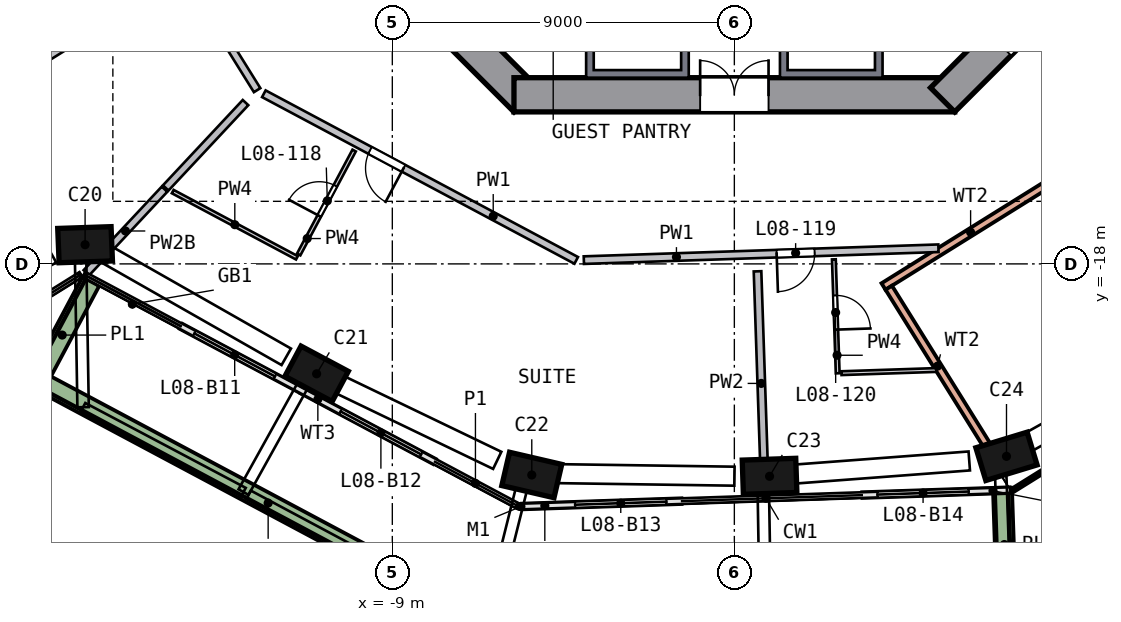
"""IFC4 building model, lengths in metres.
Left out: names, types, materials, properties, quantities, classifications, styles, units other than length and angle.
Written with IfcOpenShell. Run it as: python <this file> out.ifc"""

import sys

from ifc_helpers import new_model, si_unit, direction, frame, frame_2d, origin, origin_2d, place, context, subcontext, project, spatial, polyline, rectangle, outline, extrude, element, fill, save


model = new_model("IFC4")
c1 = context("Model", 3, precision=1e-05, world=origin(), true_north=direction((0.0, 1.0)))
c2 = subcontext(c1, "Body", "Model", "MODEL_VIEW")
j1 = project(units=[si_unit("LENGTHUNIT", "METRE"), si_unit("PLANEANGLEUNIT", "RADIAN")], contexts=[c1])
p1 = place(None, origin())
s1 = spatial("IfcSite", under=j1, at=p1, CompositionType="ELEMENT")
p2 = place(p1, origin())
s2 = spatial("IfcBuilding", under=s1, at=p2, CompositionType="ELEMENT")
p3 = place(p2, frame((0.0, 0.0, 42.5)))
s3 = spatial("IfcBuildingStorey", under=s2, at=p3, CompositionType="ELEMENT", Elevation=42.5)
p4 = place(p3, frame((-17.185, -17.397, 0.0), z_axis=(0.083388877, -0.0810324, 0.993217018), x_axis=(-0.995963497, -0.039994314, 0.080356499)))
e1 = element("IfcColumn", 1, at=p4, inside=s3, PredefinedType="COLUMN", context=c2, shape_type="SweptSolid", body=[
    extrude(rectangle(XDim=1.4, YDim=0.9, at=origin_2d()), origin(), (0.0, 0.0, 1.0), 3.212),
])
p5 = place(p3, frame((-11.113, -20.829, 0.0), z_axis=(0.099549321, -0.052094183, 0.993668017), x_axis=(0.876466072, -0.468171177, -0.112352009)))
e2 = element("IfcColumn", 2, at=p5, inside=s3, PredefinedType="COLUMN", context=c2, shape_type="SweptSolid", body=[
    extrude(rectangle(XDim=1.4, YDim=0.9, at=origin_2d()), origin(), (0.0, 0.0, 1.0), 3.21),
])
p6 = place(p3, frame((-5.466, -23.525, 0.0), z_axis=(0.112140805, -0.025013102, 0.993377463), x_axis=(-0.967681369, 0.22448272, 0.114892456)))
e3 = element("IfcColumn", 3, at=p6, inside=s3, PredefinedType="COLUMN", context=c2, shape_type="SweptSolid", body=[
    extrude(rectangle(XDim=1.4, YDim=0.9, at=origin_2d()), origin(), (0.0, 0.0, 1.0), 3.211),
])
p7 = place(p3, frame((0.791, -23.595, 0.0), z_axis=(0.112174655, 0.004715138, 0.993677319), x_axis=(0.993119451, 0.033305651, -0.112269718)))
e4 = element("IfcColumn", 4, at=p7, inside=s3, PredefinedType="COLUMN", context=c2, shape_type="SweptSolid", body=[
    extrude(rectangle(XDim=1.4, YDim=0.9, at=origin_2d()), origin(), (0.0, 0.0, 1.0), 3.21),
])
p8 = place(p3, frame((7.029, -23.106, 0.0), z_axis=(0.109632241, 0.034288586, 0.993380624), x_axis=(-0.950575339, -0.288465817, 0.114865125)))
e5 = element("IfcColumn", 5, at=p8, inside=s3, PredefinedType="COLUMN", context=c2, shape_type="SweptSolid", body=[
    extrude(rectangle(XDim=1.4, YDim=0.9, at=origin_2d()), origin(), (0.0, 0.0, 1.0), 3.211),
])
p9 = place(p3, frame((-13.682, -5.481, 0.0), z_axis=(0.0, 0.0, 1.0), x_axis=(0.707106781, -0.707106781, 0.0)))
e6 = element("IfcWall", 6, at=p9, inside=s3, PredefinedType="SHEAR", context=c2, shape_type="SweptSolid", body=[
    extrude(rectangle(XDim=11.598, YDim=0.9, at=frame_2d((5.799, 0.0))), origin(), (0.0, 0.0, 1.0), 3.5),
])
p10 = place(p9, frame((2.099, 0.0, 0.0)))
e7 = element("IfcOpeningElement", 7, at=p10, cuts=e6, PredefinedType="OPENING", context=c2, shape_type="SweptSolid", body=[
    extrude(rectangle(XDim=1.2, YDim=2.1, at=frame_2d((0.6, 1.05))), frame((0.0, 0.46, 0.0), z_axis=(0.0, -1.0, 0.0), x_axis=(1.0, 0.0, 0.0)), (0.0, 0.0, 1.0), 0.92),
])
p11 = place(p3, frame((-5.799, -13.55, 0.0), z_axis=(0.0, 0.0, 1.0), x_axis=(1.0, 0.0, 0.0)))
e8 = element("IfcWall", 8, at=p11, inside=s3, PredefinedType="SHEAR", context=c2, shape_type="SweptSolid", body=[
    extrude(rectangle(XDim=11.598, YDim=0.9, at=frame_2d((5.799, 0.0))), origin(), (0.0, 0.0, 1.0), 3.5),
])
p12 = place(p11, frame((4.899, 0.0, 0.0)))
e9 = element("IfcOpeningElement", 9, at=p12, cuts=e8, PredefinedType="OPENING", context=c2, shape_type="SweptSolid", body=[
    extrude(rectangle(XDim=1.8, YDim=2.1, at=frame_2d((0.9, 1.05))), frame((0.0, 0.46, 0.0), z_axis=(0.0, -1.0, 0.0), x_axis=(1.0, 0.0, 0.0)), (0.0, 0.0, 1.0), 0.92),
])
p13 = place(p3, frame((5.481, -13.682, 0.0), z_axis=(0.0, 0.0, 1.0), x_axis=(0.707106781, 0.707106781, 0.0)))
e10 = element("IfcWall", 10, at=p13, inside=s3, PredefinedType="SHEAR", context=c2, shape_type="SweptSolid", body=[
    extrude(rectangle(XDim=11.598, YDim=0.9, at=frame_2d((5.799, 0.0))), origin(), (0.0, 0.0, 1.0), 3.5),
])
p14 = place(p13, frame((2.099, 0.0, 0.0)))
e11 = element("IfcOpeningElement", 11, at=p14, cuts=e10, PredefinedType="OPENING", context=c2, shape_type="SweptSolid", body=[
    extrude(rectangle(XDim=1.2, YDim=2.1, at=frame_2d((0.6, 1.05))), frame((0.0, 0.46, 0.0), z_axis=(0.0, -1.0, 0.0), x_axis=(1.0, 0.0, 0.0)), (0.0, 0.0, 1.0), 0.92),
])
p15 = place(p3, frame((-14.559, -19.642, 0.0), z_axis=(0.0, 0.0, 1.0), x_axis=(0.882272201, -0.470739592, 0.0)))
e12 = element("IfcWall", 12, at=p15, inside=s3, PredefinedType="SOLIDWALL", context=c2, shape_type="SweptSolid", body=[
    extrude(rectangle(XDim=3.6, YDim=0.15, at=frame_2d((1.8, 0.0))), origin(), (0.0, 0.0, 1.0), 2.425),
])
p16 = place(p15, frame((0.4, 0.0, 0.0)))
e13 = element("IfcOpeningElement", 13, at=p16, cuts=e12, PredefinedType="OPENING", context=c2, shape_type="SweptSolid", body=[
    extrude(rectangle(XDim=2.4, YDim=2.4, at=frame_2d((1.2, 1.2))), frame((0.0, 0.085, 0.0), z_axis=(0.0, -1.0, 0.0), x_axis=(1.0, 0.0, 0.0)), (0.0, 0.0, 1.0), 0.17),
])
p17 = place(p3, frame((-11.383, -21.337, 0.0), z_axis=(0.0, 0.0, 1.0), x_axis=(0.882291504, -0.470703411, 0.0)))
e14 = element("IfcWall", 14, at=p17, inside=s3, PredefinedType="SOLIDWALL", context=c2, shape_type="SweptSolid", body=[
    extrude(rectangle(XDim=3.961, YDim=0.15, at=frame_2d((1.98, 0.0))), origin(), (0.0, 0.0, 1.0), 2.425),
])
p18 = place(p17, frame((1.16, 0.0, 0.0)))
e15 = element("IfcOpeningElement", 15, at=p18, cuts=e14, PredefinedType="OPENING", context=c2, shape_type="SweptSolid", body=[
    extrude(rectangle(XDim=2.4, YDim=2.4, at=frame_2d((1.2, 1.2))), frame((0.0, 0.085, 0.0), z_axis=(0.0, -1.0, 0.0), x_axis=(1.0, 0.0, 0.0)), (0.0, 0.0, 1.0), 0.17),
])
p19 = place(p3, frame((-5.586, -24.384, 0.0), z_axis=(0.0, 0.0, 1.0), x_axis=(0.999437006, 0.033551033, 0.0)))
e16 = element("IfcWall", 16, at=p19, inside=s3, PredefinedType="SOLIDWALL", context=c2, shape_type="SweptSolid", body=[
    extrude(rectangle(XDim=4.199, YDim=0.15, at=frame_2d((2.099, 0.0))), origin(), (0.0, 0.0, 1.0), 2.425),
])
p20 = place(p19, frame((1.399, 0.0, 0.0)))
e17 = element("IfcOpeningElement", 17, at=p20, cuts=e16, PredefinedType="OPENING", context=c2, shape_type="SweptSolid", body=[
    extrude(rectangle(XDim=2.4, YDim=2.4, at=frame_2d((1.2, 1.2))), frame((0.0, 0.085, 0.0), z_axis=(0.0, -1.0, 0.0), x_axis=(1.0, 0.0, 0.0)), (0.0, 0.0, 1.0), 0.17),
])
p21 = place(p3, frame((3.367, -24.084, 0.0), z_axis=(0.0, 0.0, 1.0), x_axis=(0.99944008, 0.033459324, 0.0)))
e18 = element("IfcWall", 18, at=p21, inside=s3, PredefinedType="SOLIDWALL", context=c2, shape_type="SweptSolid", body=[
    extrude(rectangle(XDim=3.882, YDim=0.15, at=frame_2d((1.941, 0.0))), origin(), (0.0, 0.0, 1.0), 2.425),
])
p22 = place(p21, frame((0.4, 0.0, 0.0)))
e19 = element("IfcOpeningElement", 19, at=p22, cuts=e18, PredefinedType="OPENING", context=c2, shape_type="SweptSolid", body=[
    extrude(rectangle(XDim=2.4, YDim=2.4, at=frame_2d((1.2, 1.2))), frame((0.0, 0.085, 0.0), z_axis=(0.0, -1.0, 0.0), x_axis=(1.0, 0.0, 0.0)), (0.0, 0.0, 1.0), 0.17),
])
p23 = place(p3, frame((-16.933, -18.462, 0.0), z_axis=(0.0, 0.0, 1.0), x_axis=(-0.470655574, -0.882317024, 0.0)))
e20 = element("IfcWall", 20, at=p23, inside=s3, PredefinedType="SOLIDWALL", context=c2, shape_type="SweptSolid", body=[
    extrude(rectangle(XDim=3.199, YDim=0.5, at=frame_2d((1.6, 0.0))), origin(), (0.0, 0.0, 1.0), 0.7),
])
p24 = place(p3, frame((-18.101, -21.181, 0.0), z_axis=(0.0, 0.0, 1.0), x_axis=(0.882291093, -0.470704182, 0.0)))
e21 = element("IfcWall", 21, at=p24, inside=s3, PredefinedType="SOLIDWALL", context=c2, shape_type="SweptSolid", body=[
    extrude(rectangle(XDim=13.224, YDim=0.5, at=frame_2d((6.612, 0.0))), origin(), (0.0, 0.0, 1.0), 0.7),
])
p25 = place(p3, frame((7.15, -26.734, 0.0), z_axis=(0.0, 0.0, 1.0), x_axis=(-0.033468433, 0.999439775, 0.0)))
e22 = element("IfcWall", 22, at=p25, inside=s3, PredefinedType="SOLIDWALL", context=c2, shape_type="SweptSolid", body=[
    extrude(rectangle(XDim=2.699, YDim=0.5, at=frame_2d((1.35, 0.0))), origin(), (0.0, 0.0, 1.0), 0.7),
])
p26 = place(p3, frame((14.959, -11.721, 0.0), z_axis=(0.0, 0.0, 1.0), x_axis=(-0.848786551, -0.528735653, 0.0)))
e23 = element("IfcWall", 23, at=p26, inside=s3, PredefinedType="SOLIDWALL", context=c2, shape_type="SweptSolid", body=[
    extrude(rectangle(XDim=13.0, YDim=0.2, at=frame_2d((6.5, 0.0))), origin(), (0.0, 0.0, 1.0), 3.19),
])
p27 = place(p26, frame((5.6, 0.0, 0.0)))
e24 = element("IfcOpeningElement", 24, at=p27, cuts=e23, PredefinedType="OPENING", context=c2, shape_type="SweptSolid", body=[
    extrude(rectangle(XDim=1.8, YDim=2.4, at=frame_2d((0.9, 1.2))), frame((0.0, 0.11, 0.0), z_axis=(0.0, -1.0, 0.0), x_axis=(1.0, 0.0, 0.0)), (0.0, 0.0, 1.0), 0.22),
])
p28 = place(p3, frame((6.633, -22.753, 0.0), z_axis=(0.0, 0.0, 1.0), x_axis=(-0.528716192, 0.848798674, 0.0)))
e25 = element("IfcWall", 25, at=p28, inside=s3, PredefinedType="SOLIDWALL", context=c2, shape_type="SweptSolid", body=[
    extrude(rectangle(XDim=4.861, YDim=0.2, at=frame_2d((2.43, 0.0))), origin(), (0.0, 0.0, 1.0), 3.19),
])
p29 = place(p3, frame((7.351, -23.942, 0.0), z_axis=(0.0, 0.0, 1.0), x_axis=(0.8487921, 0.528726745, 0.0)))
e26 = element("IfcWall", 26, at=p29, inside=s3, PredefinedType="SOLIDWALL", context=c2, shape_type="SweptSolid", body=[
    extrude(rectangle(XDim=12.84, YDim=0.1, at=frame_2d((6.42, 0.0))), origin(), (0.0, 0.0, 1.0), 0.7),
])
p30 = place(p3, origin())
e27 = element("IfcWall", 27, at=p30, inside=s3, PredefinedType="SOLIDWALL", context=c2, shape_type="SweptSolid", body=[
    extrude(outline(polyline([(-1.2, -13.1), (-3.9, -13.1), (-3.9, -10.7), (-1.2, -10.7), (-1.2, -13.1)]), holes=[polyline([(-3.7, -10.9), (-3.7, -12.9), (-1.4, -12.9), (-1.4, -10.9), (-3.7, -10.9)])]), origin(), (0.0, 0.0, 1.0), 3.19),
])
p31 = place(p3, origin())
e28 = element("IfcWall", 28, at=p31, inside=s3, PredefinedType="SOLIDWALL", context=c2, shape_type="SweptSolid", body=[
    extrude(outline(polyline([(3.9, -10.7), (3.9, -13.1), (1.2, -13.1), (1.2, -10.7), (3.9, -10.7)]), holes=[polyline([(1.4, -12.9), (3.7, -12.9), (3.7, -10.9), (1.4, -10.9), (1.4, -12.9)])]), origin(), (0.0, 0.0, 1.0), 3.19),
])
p32 = place(p3, frame((-30.545, -17.731, 0.0), z_axis=(0.0, 0.0, 1.0), x_axis=(0.848790586, 0.528729175, 0.0)))
e29 = element("IfcWall", 29, at=p32, inside=s3, PredefinedType="SOLIDWALL", context=c2, shape_type="SweptSolid", body=[
    extrude(rectangle(XDim=17.343, YDim=0.2, at=frame_2d((8.671, 0.0))), origin(), (0.0, 0.0, 1.0), 3.19),
])
p33 = place(p32, frame((9.5, 0.0, 0.0)))
e30 = element("IfcOpeningElement", 30, at=p33, cuts=e29, PredefinedType="OPENING", context=c2, shape_type="SweptSolid", body=[
    extrude(rectangle(XDim=1.0, YDim=2.1, at=frame_2d((0.5, 1.05))), frame((0.0, 0.11, 0.0), z_axis=(0.0, -1.0, 0.0), x_axis=(1.0, 0.0, 0.0)), (0.0, 0.0, 1.0), 0.22),
])
p34 = place(p3, frame((-14.491, -10.323, 0.0), z_axis=(0.0, 0.0, 1.0), x_axis=(-0.848783902, -0.528739905, 0.0)))
e31 = element("IfcWall", 31, at=p34, inside=s3, PredefinedType="SOLIDWALL", context=c2, shape_type="SweptSolid", body=[
    extrude(rectangle(XDim=17.543, YDim=0.2, at=frame_2d((8.771, 0.0))), origin(), (0.0, 0.0, 1.0), 3.19),
])
p35 = place(p34, frame((12.8, 0.0, 0.0)))
e32 = element("IfcOpeningElement", 32, at=p35, cuts=e31, PredefinedType="OPENING", context=c2, shape_type="SweptSolid", body=[
    extrude(rectangle(XDim=1.0, YDim=2.1, at=frame_2d((0.5, 1.05))), frame((0.0, 0.11, 0.0), z_axis=(0.0, -1.0, 0.0), x_axis=(1.0, 0.0, 0.0)), (0.0, 0.0, 1.0), 0.22),
])
p36 = place(p3, frame((-14.386, -10.493, 0.0), z_axis=(0.0, 0.0, 1.0), x_axis=(0.52876097, -0.84877078, 0.0)))
e33 = element("IfcWall", 33, at=p36, inside=s3, PredefinedType="SOLIDWALL", context=c2, shape_type="SweptSolid", body=[
    extrude(rectangle(XDim=3.458, YDim=0.2, at=frame_2d((1.729, 0.0))), origin(), (0.0, 0.0, 1.0), 3.19),
])
p37 = place(p3, frame((-4.161, -17.907, 0.0), z_axis=(0.0, 0.0, 1.0), x_axis=(-0.882295625, 0.470695688, 0.0)))
e34 = element("IfcWall", 34, at=p37, inside=s3, PredefinedType="SOLIDWALL", context=c2, shape_type="SweptSolid", body=[
    extrude(rectangle(XDim=9.316, YDim=0.2, at=frame_2d((4.658, 0.0))), origin(), (0.0, 0.0, 1.0), 3.19),
])
p38 = place(p37, frame((5.15, 0.0, 0.0)))
e35 = element("IfcOpeningElement", 35, at=p38, cuts=e34, PredefinedType="OPENING", context=c2, shape_type="SweptSolid", body=[
    extrude(rectangle(XDim=1.0, YDim=2.1, at=frame_2d((0.5, 1.05))), frame((0.0, 0.11, 0.0), z_axis=(0.0, -1.0, 0.0), x_axis=(1.0, 0.0, 0.0)), (0.0, 0.0, 1.0), 0.22),
])
p39 = place(p3, frame((5.371, -17.588, 0.0), z_axis=(0.0, 0.0, 1.0), x_axis=(-0.999438766, -0.033498549, 0.0)))
e36 = element("IfcWall", 36, at=p39, inside=s3, PredefinedType="SOLIDWALL", context=c2, shape_type="SweptSolid", body=[
    extrude(rectangle(XDim=9.336, YDim=0.2, at=frame_2d((4.668, 0.0))), origin(), (0.0, 0.0, 1.0), 3.19),
])
p40 = place(p39, frame((3.26, 0.0, 0.0)))
e37 = element("IfcOpeningElement", 37, at=p40, cuts=e36, PredefinedType="OPENING", context=c2, shape_type="SweptSolid", body=[
    extrude(rectangle(XDim=1.0, YDim=2.1, at=frame_2d((0.5, 1.05))), frame((0.0, 0.11, 0.0), z_axis=(0.0, -1.0, 0.0), x_axis=(1.0, 0.0, 0.0)), (0.0, 0.0, 1.0), 0.22),
])
p41 = place(p3, frame((-14.994, -16.034, 0.0), z_axis=(0.0, 0.0, 1.0), x_axis=(-0.682993923, -0.730424056, 0.0)))
e38 = element("IfcWall", 38, at=p41, inside=s3, PredefinedType="SOLIDWALL", context=c2, shape_type="SweptSolid", body=[
    extrude(rectangle(XDim=3.011, YDim=0.2, at=frame_2d((1.506, 0.0))), origin(), (0.0, 0.0, 1.0), 2.69),
])
p42 = place(p3, frame((-12.863, -13.755, 0.0), z_axis=(0.0, 0.0, 1.0), x_axis=(-0.683008227, -0.730410681, 0.0)))
e39 = element("IfcWall", 39, at=p42, inside=s3, PredefinedType="SOLIDWALL", context=c2, shape_type="SweptSolid", body=[
    extrude(rectangle(XDim=3.075, YDim=0.2, at=frame_2d((1.537, 0.0))), origin(), (0.0, 0.0, 1.0), 3.19),
])
p43 = place(p3, frame((0.61, -18.195, 0.0), z_axis=(0.0, 0.0, 1.0), x_axis=(0.033460809, -0.99944003, 0.0)))
e40 = element("IfcWall", 40, at=p43, inside=s3, PredefinedType="SOLIDWALL", context=c2, shape_type="SweptSolid", body=[
    extrude(rectangle(XDim=5.903, YDim=0.2, at=frame_2d((2.951, 0.0))), origin(), (0.0, 0.0, 1.0), 3.19),
])
p44 = place(p3, frame((-11.511, -17.84, 0.0), z_axis=(0.0, 0.0, 1.0), x_axis=(-0.882303673, 0.470680601, 0.0)))
e41 = element("IfcWall", 41, at=p44, inside=s3, PredefinedType="PARTITIONING", context=c2, shape_type="SweptSolid", body=[
    extrude(rectangle(XDim=3.704, YDim=0.1, at=frame_2d((1.852, 0.0))), origin(), (0.0, 0.0, 1.0), 3.19),
])
p45 = place(p3, frame((-11.464, -17.752, 0.0), z_axis=(0.0, 0.0, 1.0), x_axis=(0.470714946, 0.88228535, 0.0)))
e42 = element("IfcWall", 42, at=p45, inside=s3, PredefinedType="PARTITIONING", context=c2, shape_type="SweptSolid", body=[
    extrude(rectangle(XDim=3.1, YDim=0.1, at=frame_2d((1.55, 0.0))), origin(), (0.0, 0.0, 1.0), 3.19),
])
p46 = place(p45, frame((1.15, 0.0, 0.0)))
e43 = element("IfcOpeningElement", 43, at=p46, cuts=e42, PredefinedType="OPENING", context=c2, shape_type="SweptSolid", body=[
    extrude(rectangle(XDim=0.9, YDim=2.1, at=frame_2d((0.45, 1.05))), frame((0.0, 0.06, 0.0), z_axis=(0.0, -1.0, 0.0), x_axis=(1.0, 0.0, 0.0)), (0.0, 0.0, 1.0), 0.12),
])
p47 = place(p3, frame((2.619, -17.881, 0.0), z_axis=(0.0, 0.0, 1.0), x_axis=(0.033528894, -0.999437749, 0.0)))
e44 = element("IfcWall", 44, at=p47, inside=s3, PredefinedType="PARTITIONING", context=c2, shape_type="SweptSolid", body=[
    extrude(rectangle(XDim=3.0, YDim=0.1, at=frame_2d((1.5, 0.0))), origin(), (0.0, 0.0, 1.0), 3.19),
])
p48 = place(p47, frame((0.95, 0.0, 0.0)))
e45 = element("IfcOpeningElement", 45, at=p48, cuts=e44, PredefinedType="OPENING", context=c2, shape_type="SweptSolid", body=[
    extrude(rectangle(XDim=0.9, YDim=2.1, at=frame_2d((0.45, 1.05))), frame((0.0, 0.06, 0.0), z_axis=(0.0, -1.0, 0.0), x_axis=(1.0, 0.0, 0.0)), (0.0, 0.0, 1.0), 0.12),
])
p49 = place(p3, frame((5.314, -20.792, 0.0), z_axis=(0.0, 0.0, 1.0), x_axis=(-0.999440448, -0.033448345, 0.0)))
e46 = element("IfcWall", 46, at=p49, inside=s3, PredefinedType="PARTITIONING", context=c2, shape_type="SweptSolid", body=[
    extrude(rectangle(XDim=2.496, YDim=0.1, at=frame_2d((1.248, 0.0))), origin(), (0.0, 0.0, 1.0), 3.19),
])
p50 = place(p16, origin())
e47 = element("IfcDoor", 47, at=p50, inside=s3, OperationType="SLIDING_TO_RIGHT", PredefinedType="DOOR", context=c2, shape_type="SweptSolid", body=[
    extrude(rectangle(XDim=2.4, YDim=2.4, at=frame_2d((1.2, 1.2))), frame((0.0, 0.025, 0.0), z_axis=(0.0, -1.0, 0.0), x_axis=(1.0, 0.0, 0.0)), (0.0, 0.0, 1.0), 0.05),
])
fill(e13, e47)
p51 = place(p18, origin())
e48 = element("IfcDoor", 48, at=p51, inside=s3, OperationType="SLIDING_TO_LEFT", PredefinedType="DOOR", context=c2, shape_type="SweptSolid", body=[
    extrude(rectangle(XDim=2.4, YDim=2.4, at=frame_2d((1.2, 1.2))), frame((0.0, 0.025, 0.0), z_axis=(0.0, -1.0, 0.0), x_axis=(1.0, 0.0, 0.0)), (0.0, 0.0, 1.0), 0.05),
])
fill(e15, e48)
p52 = place(p20, origin())
e49 = element("IfcDoor", 49, at=p52, inside=s3, OperationType="SLIDING_TO_LEFT", PredefinedType="DOOR", context=c2, shape_type="SweptSolid", body=[
    extrude(rectangle(XDim=2.4, YDim=2.4, at=frame_2d((1.2, 1.2))), frame((0.0, 0.025, 0.0), z_axis=(0.0, -1.0, 0.0), x_axis=(1.0, 0.0, 0.0)), (0.0, 0.0, 1.0), 0.05),
])
fill(e17, e49)
p53 = place(p22, origin())
e50 = element("IfcDoor", 50, at=p53, inside=s3, OperationType="SLIDING_TO_RIGHT", PredefinedType="DOOR", context=c2, shape_type="SweptSolid", body=[
    extrude(rectangle(XDim=2.4, YDim=2.4, at=frame_2d((1.2, 1.2))), frame((0.0, 0.025, 0.0), z_axis=(0.0, -1.0, 0.0), x_axis=(1.0, 0.0, 0.0)), (0.0, 0.0, 1.0), 0.05),
])
fill(e19, e50)
p54 = place(p12, origin())
e51 = element("IfcDoor", 51, at=p54, inside=s3, OperationType="DOUBLE_DOOR_SINGLE_SWING", PredefinedType="DOOR", context=c2, shape_type="SweptSolid", body=[
    extrude(rectangle(XDim=1.8, YDim=2.1, at=frame_2d((0.9, 1.05))), frame((0.0, 0.025, 0.0), z_axis=(0.0, -1.0, 0.0), x_axis=(1.0, 0.0, 0.0)), (0.0, 0.0, 1.0), 0.05),
])
fill(e9, e51)
p55 = place(p38, origin())
e52 = element("IfcDoor", 52, at=p55, inside=s3, OperationType="SINGLE_SWING_LEFT", PredefinedType="DOOR", context=c2, shape_type="SweptSolid", body=[
    extrude(rectangle(XDim=1.0, YDim=2.1, at=frame_2d((0.5, 1.05))), frame((0.0, 0.025, 0.0), z_axis=(0.0, -1.0, 0.0), x_axis=(1.0, 0.0, 0.0)), (0.0, 0.0, 1.0), 0.05),
])
fill(e35, e52)
p56 = place(p46, origin())
e53 = element("IfcDoor", 53, at=p56, inside=s3, OperationType="SINGLE_SWING_LEFT", PredefinedType="DOOR", context=c2, shape_type="SweptSolid", body=[
    extrude(rectangle(XDim=0.9, YDim=2.1, at=frame_2d((0.45, 1.05))), frame((0.0, 0.025, 0.0), z_axis=(0.0, -1.0, 0.0), x_axis=(1.0, 0.0, 0.0)), (0.0, 0.0, 1.0), 0.05),
])
fill(e43, e53)
p57 = place(p40, origin())
e54 = element("IfcDoor", 54, at=p57, inside=s3, OperationType="SINGLE_SWING_RIGHT", PredefinedType="DOOR", context=c2, shape_type="SweptSolid", body=[
    extrude(rectangle(XDim=1.0, YDim=2.1, at=frame_2d((0.5, 1.05))), frame((0.0, 0.025, 0.0), z_axis=(0.0, -1.0, 0.0), x_axis=(1.0, 0.0, 0.0)), (0.0, 0.0, 1.0), 0.05),
])
fill(e37, e54)
p58 = place(p48, origin())
e55 = element("IfcDoor", 55, at=p58, inside=s3, OperationType="SINGLE_SWING_RIGHT", PredefinedType="DOOR", context=c2, shape_type="SweptSolid", body=[
    extrude(rectangle(XDim=0.9, YDim=2.1, at=frame_2d((0.45, 1.05))), frame((0.0, 0.025, 0.0), z_axis=(0.0, -1.0, 0.0), x_axis=(1.0, 0.0, 0.0)), (0.0, 0.0, 1.0), 0.05),
])
fill(e45, e55)
save(model, sys.argv[1])
